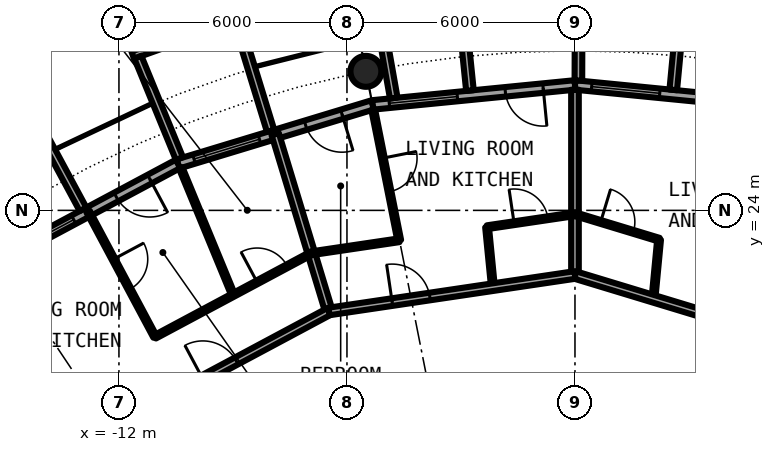
"""IFC4 building model, lengths in metres.
Left out: names, types, materials, properties, quantities, classifications, styles, units other than length and angle.
Written with IfcOpenShell. Run it as: python <this file> out.ifc"""

import sys

from ifc_helpers import new_model, si_unit, direction, frame, frame_2d, origin, origin_2d, place, context, subcontext, project, spatial, rectangle, circle, hollow_circle, extrude, element, fill, save


model = new_model("IFC4")
c1 = context("Model", 3, precision=1e-05, world=origin(), true_north=direction((0.0, 1.0)))
c2 = subcontext(c1, "Body", "Model", "MODEL_VIEW")
j1 = project(units=[si_unit("LENGTHUNIT", "METRE"), si_unit("PLANEANGLEUNIT", "RADIAN")], contexts=[c1])
p1 = place(None, origin())
s1 = spatial("IfcSite", under=j1, at=p1, CompositionType="ELEMENT")
p2 = place(p1, origin())
s2 = spatial("IfcBuilding", under=s1, at=p2, CompositionType="ELEMENT")
p3 = place(p2, frame((0.0, 0.0, 218.8)))
s3 = spatial("IfcBuildingStorey", under=s2, at=p3, CompositionType="ELEMENT", Elevation=218.8)
p4 = place(p3, frame((-5.501, 27.658, 0.0), z_axis=(0.0, 0.0, 1.0), x_axis=(1.0, 0.0, 0.0)))
e1 = element("IfcColumn", 1, at=p4, inside=s3, PredefinedType="COLUMN", context=c2, shape_type="SweptSolid", body=[
    extrude(hollow_circle(Radius=0.406, WallThickness=0.03, at=origin_2d()), origin(), (0.0, 0.0, 1.0), 3.05),
])
p5 = place(p3, frame((5.326, 26.775, 0.0), z_axis=(0.0, 0.0, 1.0), x_axis=(-0.995173996315, 0.098126026407, 0.0)))
e2 = element("IfcWall", 2, at=p5, inside=s3, PredefinedType="SOLIDWALL", context=c2, shape_type="SweptSolid", body=[
    extrude(rectangle(XDim=5.352, YDim=0.25, at=frame_2d((2.676, 0.0))), origin(), (0.0, 0.0, 1.0), 2.65),
])
p6 = place(p5, frame((0.841, 0.0, 0.0)))
e3 = element("IfcOpeningElement", 3, at=p6, cuts=e2, PredefinedType="OPENING", context=c2, shape_type="SweptSolid", body=[
    extrude(rectangle(XDim=1.0, YDim=2.2, at=frame_2d((0.5, 1.1))), frame((0.0, 0.135, 0.0), z_axis=(0.0, -1.0, 0.0), x_axis=(1.0, 0.0, 0.0)), (0.0, 0.0, 1.0), 0.27),
])
p7 = place(p5, frame((3.111, 0.0, 0.3)))
e4 = element("IfcOpeningElement", 4, at=p7, cuts=e2, PredefinedType="OPENING", context=c2, shape_type="SweptSolid", body=[
    extrude(rectangle(XDim=1.8, YDim=2.1, at=frame_2d((0.9, 1.05))), frame((0.0, 0.135, 0.0), z_axis=(0.0, -1.0, 0.0), x_axis=(1.0, 0.0, 0.0)), (0.0, 0.0, 1.0), 0.27),
])
p8 = place(p3, frame((2.586, 27.171, -0.03), z_axis=(0.0, 0.0, 1.0), x_axis=(0.094548432284, 0.995520262954, 0.0)))
e5 = element("IfcWall", 5, at=p8, inside=s3, PredefinedType="SOLIDWALL", context=c2, shape_type="SweptSolid", body=[
    extrude(rectangle(XDim=3.006, YDim=0.2, at=frame_2d((1.503, 0.0))), origin(), (0.0, 0.0, 1.0), 2.68),
])
p9 = place(p3, frame((0.09, 27.417, -0.03), z_axis=(0.0, 0.0, 1.0), x_axis=(0.00347308367, 0.999993968827, 0.0)))
e6 = element("IfcWall", 6, at=p9, inside=s3, PredefinedType="SOLIDWALL", context=c2, shape_type="SweptSolid", body=[
    extrude(rectangle(XDim=2.882, YDim=0.2, at=frame_2d((1.441, 0.0))), origin(), (0.0, 0.0, 1.0), 2.68),
])
p10 = place(p3, frame((0.0, 27.3, 0.0), z_axis=(0.0, 0.0, 1.0), x_axis=(-0.995173996315, -0.098126026407, 0.0)))
e7 = element("IfcWall", 7, at=p10, inside=s3, PredefinedType="SOLIDWALL", context=c2, shape_type="SweptSolid", body=[
    extrude(rectangle(XDim=5.352, YDim=0.25, at=frame_2d((2.676, 0.0))), origin(), (0.0, 0.0, 1.0), 2.65),
])
p11 = place(p10, frame((0.841, 0.0, 0.0)))
e8 = element("IfcOpeningElement", 8, at=p11, cuts=e7, PredefinedType="OPENING", context=c2, shape_type="SweptSolid", body=[
    extrude(rectangle(XDim=1.0, YDim=2.2, at=frame_2d((0.5, 1.1))), frame((0.0, 0.135, 0.0), z_axis=(0.0, -1.0, 0.0), x_axis=(1.0, 0.0, 0.0)), (0.0, 0.0, 1.0), 0.27),
])
p12 = place(p10, frame((3.111, 0.0, 0.3)))
e9 = element("IfcOpeningElement", 9, at=p12, cuts=e7, PredefinedType="OPENING", context=c2, shape_type="SweptSolid", body=[
    extrude(rectangle(XDim=1.8, YDim=2.1, at=frame_2d((0.9, 1.05))), frame((0.0, 0.135, 0.0), z_axis=(0.0, -1.0, 0.0), x_axis=(1.0, 0.0, 0.0)), (0.0, 0.0, 1.0), 0.27),
])
p13 = place(p3, frame((-2.764, 27.153, -0.03), z_axis=(0.0, 0.0, 1.0), x_axis=(-0.101505487237, 0.994834979311, 0.0)))
e10 = element("IfcWall", 10, at=p13, inside=s3, PredefinedType="SOLIDWALL", context=c2, shape_type="SweptSolid", body=[
    extrude(rectangle(XDim=3.007, YDim=0.2, at=frame_2d((1.503, 0.0))), origin(), (0.0, 0.0, 1.0), 2.68),
])
p14 = place(p3, frame((-4.769, 26.956, -0.03), z_axis=(0.0, 0.0, 1.0), x_axis=(-0.174056778901, 0.984735618183, 0.0)))
e11 = element("IfcWall", 11, at=p14, inside=s3, PredefinedType="SOLIDWALL", context=c2, shape_type="SweptSolid", body=[
    extrude(rectangle(XDim=2.925, YDim=0.2, at=frame_2d((1.462, 0.0))), origin(), (0.0, 0.0, 1.0), 2.68),
])
p15 = place(p3, frame((-5.326, 26.775, 0.0), z_axis=(0.0, 0.0, 1.0), x_axis=(-0.956965678721, -0.290201119486, 0.0)))
e12 = element("IfcWall", 12, at=p15, inside=s3, PredefinedType="SOLIDWALL", context=c2, shape_type="SweptSolid", body=[
    extrude(rectangle(XDim=5.351, YDim=0.25, at=frame_2d((2.676, 0.0))), origin(), (0.0, 0.0, 1.0), 2.65),
])
p16 = place(p15, frame((0.841, 0.0, 0.0)))
e13 = element("IfcOpeningElement", 13, at=p16, cuts=e12, PredefinedType="OPENING", context=c2, shape_type="SweptSolid", body=[
    extrude(rectangle(XDim=1.0, YDim=2.2, at=frame_2d((0.5, 1.1))), frame((0.0, 0.135, 0.0), z_axis=(0.0, -1.0, 0.0), x_axis=(1.0, 0.0, 0.0)), (0.0, 0.0, 1.0), 0.27),
])
p17 = place(p15, frame((3.111, 0.0, 0.3)))
e14 = element("IfcOpeningElement", 14, at=p17, cuts=e12, PredefinedType="OPENING", context=c2, shape_type="SweptSolid", body=[
    extrude(rectangle(XDim=1.8, YDim=2.1, at=frame_2d((0.9, 1.05))), frame((0.0, 0.135, 0.0), z_axis=(0.0, -1.0, 0.0), x_axis=(1.0, 0.0, 0.0)), (0.0, 0.0, 1.0), 0.27),
])
p18 = place(p3, frame((-8.82, 29.093, -0.03), z_axis=(0.0, 0.0, 1.0), x_axis=(-0.941461077774, -0.337121697664, 0.0)))
e15 = element("IfcWall", 15, at=p18, inside=s3, PredefinedType="SOLIDWALL", context=c2, shape_type="SweptSolid", body=[
    extrude(rectangle(XDim=2.993, YDim=0.2, at=frame_2d((1.497, 0.0))), origin(), (0.0, 0.0, 1.0), 2.68),
])
p19 = place(p18, frame((0.457, 0.0, 0.33)))
e16 = element("IfcOpeningElement", 16, at=p19, cuts=e15, PredefinedType="OPENING", context=c2, shape_type="SweptSolid", body=[
    extrude(circle(Radius=1.04, at=frame_2d((1.04, 1.04))), frame((0.0, 0.11, 0.0), z_axis=(0.0, -1.0, 0.0), x_axis=(1.0, 0.0, 0.0)), (0.0, 0.0, 1.0), 0.22),
])
p20 = place(p3, frame((-8.009, 26.092, -0.03), z_axis=(0.0, 0.0, 1.0), x_axis=(-0.293406695073, 0.955987715029, 0.0)))
e17 = element("IfcWall", 17, at=p20, inside=s3, PredefinedType="SOLIDWALL", context=c2, shape_type="SweptSolid", body=[
    extrude(rectangle(XDim=3.006, YDim=0.2, at=frame_2d((1.503, 0.0))), origin(), (0.0, 0.0, 1.0), 2.68),
])
p21 = place(p3, frame((-10.409, 25.364, -0.03), z_axis=(0.0, 0.0, 1.0), x_axis=(-0.379509886562, 0.925187681501, 0.0)))
e18 = element("IfcWall", 18, at=p21, inside=s3, PredefinedType="SOLIDWALL", context=c2, shape_type="SweptSolid", body=[
    extrude(rectangle(XDim=2.883, YDim=0.2, at=frame_2d((1.441, 0.0))), origin(), (0.0, 0.0, 1.0), 2.68),
])
p22 = place(p3, frame((-10.447, 25.222, 0.0), z_axis=(0.0, 0.0, 1.0), x_axis=(-0.881915646801, -0.471407246368, 0.0)))
e19 = element("IfcWall", 19, at=p22, inside=s3, PredefinedType="SOLIDWALL", context=c2, shape_type="SweptSolid", body=[
    extrude(rectangle(XDim=5.352, YDim=0.25, at=frame_2d((2.676, 0.0))), origin(), (0.0, 0.0, 1.0), 2.65),
])
p23 = place(p22, frame((0.841, 0.0, 0.0)))
e20 = element("IfcOpeningElement", 20, at=p23, cuts=e19, PredefinedType="OPENING", context=c2, shape_type="SweptSolid", body=[
    extrude(rectangle(XDim=1.0, YDim=2.2, at=frame_2d((0.5, 1.1))), frame((0.0, 0.135, 0.0), z_axis=(0.0, -1.0, 0.0), x_axis=(1.0, 0.0, 0.0)), (0.0, 0.0, 1.0), 0.27),
])
p24 = place(p22, frame((3.111, 0.0, 0.3)))
e21 = element("IfcOpeningElement", 21, at=p24, cuts=e19, PredefinedType="OPENING", context=c2, shape_type="SweptSolid", body=[
    extrude(rectangle(XDim=1.8, YDim=2.1, at=frame_2d((0.9, 1.05))), frame((0.0, 0.135, 0.0), z_axis=(0.0, -1.0, 0.0), x_axis=(1.0, 0.0, 0.0)), (0.0, 0.0, 1.0), 0.27),
])
p25 = place(p3, frame((-12.945, 24.029, -0.03), z_axis=(0.0, 0.0, 1.0), x_axis=(-0.474424310775, 0.88029629861, 0.0)))
e22 = element("IfcWall", 22, at=p25, inside=s3, PredefinedType="SOLIDWALL", context=c2, shape_type="SweptSolid", body=[
    extrude(rectangle(XDim=3.006, YDim=0.2, at=frame_2d((1.503, 0.0))), origin(), (0.0, 0.0, 1.0), 2.68),
])
p26 = place(p3, frame((-12.81, 23.966, 0.0), z_axis=(0.0, 0.0, 1.0), x_axis=(0.471372010014, -0.881934480659, 0.0)))
e23 = element("IfcWall", 23, at=p26, inside=s3, PredefinedType="PARTITIONING", context=c2, shape_type="SweptSolid", body=[
    extrude(rectangle(XDim=3.734, YDim=0.1, at=frame_2d((1.867, 0.0))), origin(), (0.0, 0.0, 1.0), 2.65),
])
p27 = place(p26, frame((1.417, 0.0, 0.0)))
e24 = element("IfcOpeningElement", 24, at=p27, cuts=e23, PredefinedType="OPENING", context=c2, shape_type="SweptSolid", body=[
    extrude(rectangle(XDim=0.9, YDim=2.3, at=frame_2d((0.45, 1.15))), frame((0.0, 0.06, 0.0), z_axis=(0.0, -1.0, 0.0), x_axis=(1.0, 0.0, 0.0)), (0.0, 0.0, 1.0), 0.12),
])
p28 = place(p3, frame((-10.375, 25.116, 0.0), z_axis=(0.0, 0.0, 1.0), x_axis=(0.381733837918, -0.924272295911, 0.0)))
e25 = element("IfcWall", 25, at=p28, inside=s3, PredefinedType="PARTITIONING", context=c2, shape_type="SweptSolid", body=[
    extrude(rectangle(XDim=3.618, YDim=0.1, at=frame_2d((1.809, 0.0))), origin(), (0.0, 0.0, 1.0), 2.65),
])
p29 = place(p3, frame((-7.888, 26.005, 0.0), z_axis=(0.0, 0.0, 1.0), x_axis=(0.290053269332, -0.957010502006, 0.0)))
e26 = element("IfcWall", 26, at=p29, inside=s3, PredefinedType="PARTITIONING", context=c2, shape_type="SweptSolid", body=[
    extrude(rectangle(XDim=4.874, YDim=0.2, at=frame_2d((2.437, 0.0))), origin(), (0.0, 0.0, 1.0), 2.65),
])
p30 = place(p3, frame((-5.31, 26.651, 0.0), z_axis=(0.0, 0.0, 1.0), x_axis=(0.195486409601, -0.980706410533, 0.0)))
e27 = element("IfcWall", 27, at=p30, inside=s3, PredefinedType="PARTITIONING", context=c2, shape_type="SweptSolid", body=[
    extrude(rectangle(XDim=3.504, YDim=0.1, at=frame_2d((1.752, 0.0))), origin(), (0.0, 0.0, 1.0), 2.65),
])
p31 = place(p30, frame((1.302, 0.0, 0.0)))
e28 = element("IfcOpeningElement", 28, at=p31, cuts=e27, PredefinedType="OPENING", context=c2, shape_type="SweptSolid", body=[
    extrude(rectangle(XDim=0.9, YDim=2.3, at=frame_2d((0.45, 1.15))), frame((0.0, 0.06, 0.0), z_axis=(0.0, -1.0, 0.0), x_axis=(1.0, 0.0, 0.0)), (0.0, 0.0, 1.0), 0.12),
])
p32 = place(p3, frame((-2.313, 23.557, 0.0), z_axis=(0.0, 0.0, 1.0), x_axis=(0.097840737576, -0.995202085041, 0.0)))
e29 = element("IfcWall", 29, at=p32, inside=s3, PredefinedType="PARTITIONING", context=c2, shape_type="SweptSolid", body=[
    extrude(rectangle(XDim=1.584, YDim=0.1, at=frame_2d((0.792, 0.0))), origin(), (0.0, 0.0, 1.0), 2.65),
])
p33 = place(p3, frame((0.0, 22.3, 0.0), z_axis=(0.0, 0.0, 1.0), x_axis=(0.0, 1.0, 0.0)))
e30 = element("IfcWall", 30, at=p33, inside=s3, PredefinedType="PARTITIONING", context=c2, shape_type="SweptSolid", body=[
    extrude(rectangle(XDim=4.875, YDim=0.2, at=frame_2d((2.438, 0.0))), origin(), (0.0, 0.0, 1.0), 2.65),
])
p34 = place(p3, frame((2.065, 21.674, 0.0), z_axis=(0.0, 0.0, 1.0), x_axis=(0.094720578196, 0.995503898569, 0.0)))
e31 = element("IfcWall", 31, at=p34, inside=s3, PredefinedType="PARTITIONING", context=c2, shape_type="SweptSolid", body=[
    extrude(rectangle(XDim=1.562, YDim=0.1, at=frame_2d((0.781, 0.0))), origin(), (0.0, 0.0, 1.0), 2.65),
])
p35 = place(p3, frame((0.0, 22.3, 0.0), z_axis=(0.0, 0.0, 1.0), x_axis=(0.956942051091, -0.290279022415, 0.0)))
e32 = element("IfcWall", 32, at=p35, inside=s3, PredefinedType="PARTITIONING", context=c2, shape_type="SweptSolid", body=[
    extrude(rectangle(XDim=12.946, YDim=0.2, at=frame_2d((6.473, 0.0))), origin(), (0.0, 0.0, 1.0), 2.65),
])
p36 = place(p35, frame((7.052, 0.0, 0.0)))
e33 = element("IfcOpeningElement", 33, at=p36, cuts=e32, PredefinedType="OPENING", context=c2, shape_type="SweptSolid", body=[
    extrude(rectangle(XDim=1.0, YDim=2.3, at=frame_2d((0.5, 1.15))), frame((0.0, 0.11, 0.0), z_axis=(0.0, -1.0, 0.0), x_axis=(1.0, 0.0, 0.0)), (0.0, 0.0, 1.0), 0.22),
])
p37 = place(p3, frame((-14.147, 17.238, 0.0), z_axis=(0.0, 0.0, 1.0), x_axis=(0.881912965532, 0.471412262491, 0.0)))
e34 = element("IfcWall", 34, at=p37, inside=s3, PredefinedType="PARTITIONING", context=c2, shape_type="SweptSolid", body=[
    extrude(rectangle(XDim=8.702, YDim=0.2, at=frame_2d((4.351, 0.0))), origin(), (0.0, 0.0, 1.0), 2.65),
])
p38 = place(p37, frame((4.937, 0.0, 0.0)))
e35 = element("IfcOpeningElement", 35, at=p38, cuts=e34, PredefinedType="OPENING", context=c2, shape_type="SweptSolid", body=[
    extrude(rectangle(XDim=1.0, YDim=2.3, at=frame_2d((0.5, 1.15))), frame((0.0, 0.11, 0.0), z_axis=(0.0, -1.0, 0.0), x_axis=(1.0, 0.0, 0.0)), (0.0, 0.0, 1.0), 0.22),
])
p39 = place(p3, frame((-6.473, 21.34, 0.0), z_axis=(0.0, 0.0, 1.0), x_axis=(0.989181015112, 0.146700100005, 0.0)))
e36 = element("IfcWall", 36, at=p39, inside=s3, PredefinedType="PARTITIONING", context=c2, shape_type="SweptSolid", body=[
    extrude(rectangle(XDim=6.544, YDim=0.2, at=frame_2d((3.272, 0.0))), origin(), (0.0, 0.0, 1.0), 2.65),
])
p40 = place(p39, frame((1.681, 0.0, 0.0)))
e37 = element("IfcOpeningElement", 37, at=p40, cuts=e36, PredefinedType="OPENING", context=c2, shape_type="SweptSolid", body=[
    extrude(rectangle(XDim=1.0, YDim=2.3, at=frame_2d((0.5, 1.15))), frame((0.0, 0.11, 0.0), z_axis=(0.0, -1.0, 0.0), x_axis=(1.0, 0.0, 0.0)), (0.0, 0.0, 1.0), 0.22),
])
p41 = place(p3, frame((0.003, 23.899, 0.0), z_axis=(0.0, 0.0, 1.0), x_axis=(0.956994210955, -0.29010701508, 0.0)))
e38 = element("IfcWall", 38, at=p41, inside=s3, PredefinedType="PARTITIONING", context=c2, shape_type="SweptSolid", body=[
    extrude(rectangle(XDim=2.312, YDim=0.1, at=frame_2d((1.156, 0.0))), origin(), (0.0, 0.0, 1.0), 2.65),
])
p42 = place(p41, frame((0.703, 0.0, 0.0)))
e39 = element("IfcOpeningElement", 39, at=p42, cuts=e38, PredefinedType="OPENING", context=c2, shape_type="SweptSolid", body=[
    extrude(rectangle(XDim=0.9, YDim=2.3, at=frame_2d((0.45, 1.15))), frame((0.0, 0.06, 0.0), z_axis=(0.0, -1.0, 0.0), x_axis=(1.0, 0.0, 0.0)), (0.0, 0.0, 1.0), 0.12),
])
p43 = place(p3, frame((-11.05, 20.673, 0.0), z_axis=(0.0, 0.0, 1.0), x_axis=(0.881916280728, 0.471406060405, 0.0)))
e40 = element("IfcWall", 40, at=p43, inside=s3, PredefinedType="PARTITIONING", context=c2, shape_type="SweptSolid", body=[
    extrude(rectangle(XDim=4.663, YDim=0.1, at=frame_2d((2.331, 0.0))), origin(), (0.0, 0.0, 1.0), 2.65),
])
p44 = place(p43, frame((3.047, 0.0, 0.0)))
e41 = element("IfcOpeningElement", 41, at=p44, cuts=e40, PredefinedType="OPENING", context=c2, shape_type="SweptSolid", body=[
    extrude(rectangle(XDim=0.9, YDim=2.3, at=frame_2d((0.45, 1.15))), frame((0.0, 0.06, 0.0), z_axis=(0.0, -1.0, 0.0), x_axis=(1.0, 0.0, 0.0)), (0.0, 0.0, 1.0), 0.12),
])
p45 = place(p3, frame((-6.938, 22.871, 0.0), z_axis=(0.0, 0.0, 1.0), x_axis=(0.989181588285, 0.146696235121, 0.0)))
e42 = element("IfcWall", 42, at=p45, inside=s3, PredefinedType="PARTITIONING", context=c2, shape_type="SweptSolid", body=[
    extrude(rectangle(XDim=2.338, YDim=0.1, at=frame_2d((1.169, 0.0))), origin(), (0.0, 0.0, 1.0), 2.65),
])
p46 = place(p3, frame((-2.313, 23.557, 0.0), z_axis=(0.0, 0.0, 1.0), x_axis=(0.989181588285, 0.146696235121, 0.0)))
e43 = element("IfcWall", 43, at=p46, inside=s3, PredefinedType="PARTITIONING", context=c2, shape_type="SweptSolid", body=[
    extrude(rectangle(XDim=2.338, YDim=0.1, at=frame_2d((1.169, 0.0))), origin(), (0.0, 0.0, 1.0), 2.65),
])
p47 = place(p46, frame((0.719, 0.0, 0.0)))
e44 = element("IfcOpeningElement", 44, at=p47, cuts=e43, PredefinedType="OPENING", context=c2, shape_type="SweptSolid", body=[
    extrude(rectangle(XDim=0.9, YDim=2.3, at=frame_2d((0.45, 1.15))), frame((0.0, 0.06, 0.0), z_axis=(0.0, -1.0, 0.0), x_axis=(1.0, 0.0, 0.0)), (0.0, 0.0, 1.0), 0.12),
])
p48 = place(p7, origin())
e45 = element("IfcWindow", 45, at=p48, inside=s3, PartitioningType="SINGLE_PANEL", PredefinedType="WINDOW", context=c2, shape_type="SweptSolid", body=[
    extrude(rectangle(XDim=1.8, YDim=2.1, at=frame_2d((0.9, 1.05))), frame((0.0, 0.03, 0.0), z_axis=(0.0, -1.0, 0.0), x_axis=(1.0, 0.0, 0.0)), (0.0, 0.0, 1.0), 0.06),
])
fill(e4, e45)
p49 = place(p11, origin())
e46 = element("IfcDoor", 46, at=p49, inside=s3, OperationType="SINGLE_SWING_LEFT", PredefinedType="DOOR", context=c2, shape_type="SweptSolid", body=[
    extrude(rectangle(XDim=1.0, YDim=2.2, at=frame_2d((0.5, 1.1))), frame((0.0, 0.025, 0.0), z_axis=(0.0, -1.0, 0.0), x_axis=(1.0, 0.0, 0.0)), (0.0, 0.0, 1.0), 0.05),
])
fill(e8, e46)
p50 = place(p12, origin())
e47 = element("IfcWindow", 47, at=p50, inside=s3, PartitioningType="SINGLE_PANEL", PredefinedType="WINDOW", context=c2, shape_type="SweptSolid", body=[
    extrude(rectangle(XDim=1.8, YDim=2.1, at=frame_2d((0.9, 1.05))), frame((0.0, 0.03, 0.0), z_axis=(0.0, -1.0, 0.0), x_axis=(1.0, 0.0, 0.0)), (0.0, 0.0, 1.0), 0.06),
])
fill(e9, e47)
p51 = place(p16, origin())
e48 = element("IfcDoor", 48, at=p51, inside=s3, OperationType="SINGLE_SWING_LEFT", PredefinedType="DOOR", context=c2, shape_type="SweptSolid", body=[
    extrude(rectangle(XDim=1.0, YDim=2.2, at=frame_2d((0.5, 1.1))), frame((0.0, 0.025, 0.0), z_axis=(0.0, -1.0, 0.0), x_axis=(1.0, 0.0, 0.0)), (0.0, 0.0, 1.0), 0.05),
])
fill(e13, e48)
p52 = place(p17, origin())
e49 = element("IfcWindow", 49, at=p52, inside=s3, PartitioningType="SINGLE_PANEL", PredefinedType="WINDOW", context=c2, shape_type="SweptSolid", body=[
    extrude(rectangle(XDim=1.8, YDim=2.1, at=frame_2d((0.9, 1.05))), frame((0.0, 0.03, 0.0), z_axis=(0.0, -1.0, 0.0), x_axis=(1.0, 0.0, 0.0)), (0.0, 0.0, 1.0), 0.06),
])
fill(e14, e49)
p53 = place(p23, origin())
e50 = element("IfcDoor", 50, at=p53, inside=s3, OperationType="SINGLE_SWING_LEFT", PredefinedType="DOOR", context=c2, shape_type="SweptSolid", body=[
    extrude(rectangle(XDim=1.0, YDim=2.2, at=frame_2d((0.5, 1.1))), frame((0.0, 0.025, 0.0), z_axis=(0.0, -1.0, 0.0), x_axis=(1.0, 0.0, 0.0)), (0.0, 0.0, 1.0), 0.05),
])
fill(e20, e50)
p54 = place(p24, origin())
e51 = element("IfcWindow", 51, at=p54, inside=s3, PartitioningType="SINGLE_PANEL", PredefinedType="WINDOW", context=c2, shape_type="SweptSolid", body=[
    extrude(rectangle(XDim=1.8, YDim=2.1, at=frame_2d((0.9, 1.05))), frame((0.0, 0.03, 0.0), z_axis=(0.0, -1.0, 0.0), x_axis=(1.0, 0.0, 0.0)), (0.0, 0.0, 1.0), 0.06),
])
fill(e21, e51)
p55 = place(p42, origin())
e52 = element("IfcDoor", 52, at=p55, inside=s3, OperationType="SINGLE_SWING_LEFT", PredefinedType="DOOR", context=c2, shape_type="SweptSolid", body=[
    extrude(rectangle(XDim=0.9, YDim=2.3, at=frame_2d((0.45, 1.15))), frame((0.0, 0.025, 0.0), z_axis=(0.0, -1.0, 0.0), x_axis=(1.0, 0.0, 0.0)), (0.0, 0.0, 1.0), 0.05),
])
fill(e39, e52)
p56 = place(p40, origin())
e53 = element("IfcDoor", 53, at=p56, inside=s3, OperationType="SINGLE_SWING_LEFT", PredefinedType="DOOR", context=c2, shape_type="SweptSolid", body=[
    extrude(rectangle(XDim=1.0, YDim=2.3, at=frame_2d((0.5, 1.15))), frame((0.0, 0.025, 0.0), z_axis=(0.0, -1.0, 0.0), x_axis=(1.0, 0.0, 0.0)), (0.0, 0.0, 1.0), 0.05),
])
fill(e37, e53)
p57 = place(p47, origin())
e54 = element("IfcDoor", 54, at=p57, inside=s3, OperationType="SINGLE_SWING_LEFT", PredefinedType="DOOR", context=c2, shape_type="SweptSolid", body=[
    extrude(rectangle(XDim=0.9, YDim=2.3, at=frame_2d((0.45, 1.15))), frame((0.0, 0.025, 0.0), z_axis=(0.0, -1.0, 0.0), x_axis=(1.0, 0.0, 0.0)), (0.0, 0.0, 1.0), 0.05),
])
fill(e44, e54)
p58 = place(p31, origin())
e55 = element("IfcDoor", 55, at=p58, inside=s3, OperationType="SINGLE_SWING_RIGHT", PredefinedType="DOOR", context=c2, shape_type="SweptSolid", body=[
    extrude(rectangle(XDim=0.9, YDim=2.3, at=frame_2d((0.45, 1.15))), frame((0.0, 0.025, 0.0), z_axis=(0.0, -1.0, 0.0), x_axis=(1.0, 0.0, 0.0)), (0.0, 0.0, 1.0), 0.05),
])
fill(e28, e55)
p59 = place(p38, origin())
e56 = element("IfcDoor", 56, at=p59, inside=s3, OperationType="SINGLE_SWING_RIGHT", PredefinedType="DOOR", context=c2, shape_type="SweptSolid", body=[
    extrude(rectangle(XDim=1.0, YDim=2.3, at=frame_2d((0.5, 1.15))), frame((0.0, 0.025, 0.0), z_axis=(0.0, -1.0, 0.0), x_axis=(1.0, 0.0, 0.0)), (0.0, 0.0, 1.0), 0.05),
])
fill(e35, e56)
p60 = place(p27, origin())
e57 = element("IfcDoor", 57, at=p60, inside=s3, OperationType="SINGLE_SWING_RIGHT", PredefinedType="DOOR", context=c2, shape_type="SweptSolid", body=[
    extrude(rectangle(XDim=0.9, YDim=2.3, at=frame_2d((0.45, 1.15))), frame((0.0, 0.025, 0.0), z_axis=(0.0, -1.0, 0.0), x_axis=(1.0, 0.0, 0.0)), (0.0, 0.0, 1.0), 0.05),
])
fill(e24, e57)
p61 = place(p44, origin())
e58 = element("IfcDoor", 58, at=p61, inside=s3, OperationType="SINGLE_SWING_RIGHT", PredefinedType="DOOR", context=c2, shape_type="SweptSolid", body=[
    extrude(rectangle(XDim=0.9, YDim=2.3, at=frame_2d((0.45, 1.15))), frame((0.0, 0.025, 0.0), z_axis=(0.0, -1.0, 0.0), x_axis=(1.0, 0.0, 0.0)), (0.0, 0.0, 1.0), 0.05),
])
fill(e41, e58)
save(model, sys.argv[1])
